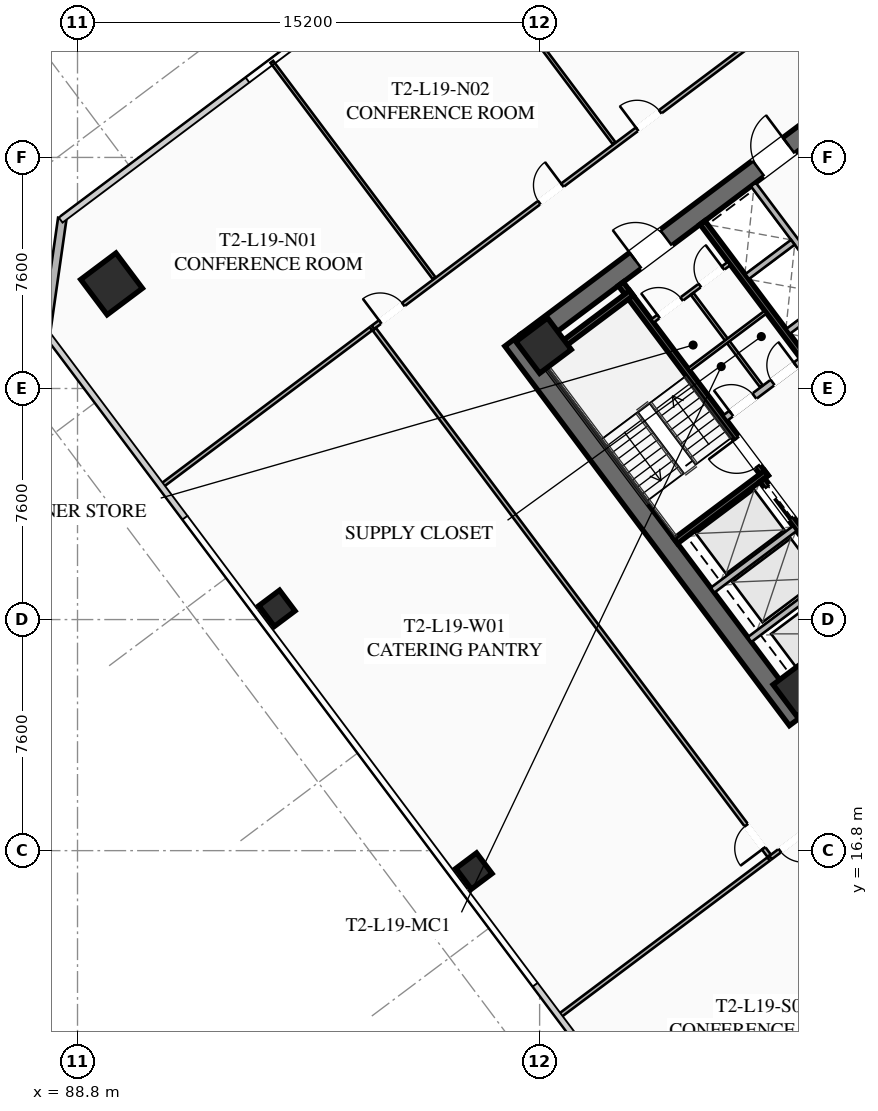
"""IFC4 building model, lengths in metres.
Left out: names, types, materials, properties, quantities, classifications, styles, units other than length and angle.
Written with IfcOpenShell. Run it as: python <this file> out.ifc"""

import sys

from ifc_helpers import new_model, si_unit, direction, frame, frame_2d, origin, origin_2d, place, context, subcontext, project, spatial, rectangle, hollow_rectangle, extrude, element, fill, save


model = new_model("IFC4")
c1 = context("Model", 3, precision=1e-05, world=origin(), true_north=direction((0.0, 1.0)))
c2 = subcontext(c1, "Body", "Model", "MODEL_VIEW")
j1 = project(units=[si_unit("LENGTHUNIT", "METRE"), si_unit("PLANEANGLEUNIT", "RADIAN")], contexts=[c1])
p1 = place(None, origin())
s1 = spatial("IfcSite", under=j1, at=p1, CompositionType="ELEMENT")
p2 = place(p1, origin())
s2 = spatial("IfcBuilding", under=s1, at=p2, CompositionType="ELEMENT")
p3 = place(p2, frame((0.0, 0.0, 74.3)))
s3 = spatial("IfcBuildingStorey", under=s2, at=p3, CompositionType="ELEMENT", Elevation=74.3)
p4 = place(p3, frame((112.476, 21.107, 0.0), z_axis=(0.0, 0.0, 1.0), x_axis=(-0.600005007985, 0.799996243986, 0.0)))
e1 = element("IfcWall", 1, at=p4, inside=s3, PredefinedType="SHEAR", context=c2, shape_type="SweptSolid", body=[
    extrude(rectangle(XDim=15.6, YDim=0.65, at=frame_2d((7.8, 0.0))), origin(), (0.0, 0.0, 1.0), 3.55),
])
p5 = place(p3, frame((124.429, 30.478, 0.0), z_axis=(0.0, 0.0, 1.0), x_axis=(-0.799998028465, -0.600002628705, 0.0)))
e2 = element("IfcWall", 2, at=p5, inside=s3, PredefinedType="SHEAR", context=c2, shape_type="SweptSolid", body=[
    extrude(rectangle(XDim=14.86, YDim=0.65, at=frame_2d((7.43, 0.0))), origin(), (0.0, 0.0, 1.0), 3.55),
])
p6 = place(p5, frame((9.13, 0.0, 0.0)))
e3 = element("IfcOpeningElement", 3, at=p6, cuts=e2, PredefinedType="OPENING", context=c2, shape_type="SweptSolid", body=[
    extrude(rectangle(XDim=1.25, YDim=2.25, at=frame_2d((0.625, 1.125))), frame((0.0, 0.335, 0.0), z_axis=(0.0, -1.0, 0.0), x_axis=(1.0, 0.0, 0.0)), (0.0, 0.0, 1.0), 0.67),
])
p7 = place(p5, frame((4.08, 0.0, 0.0)))
e4 = element("IfcOpeningElement", 4, at=p7, cuts=e2, PredefinedType="OPENING", context=c2, shape_type="SweptSolid", body=[
    extrude(rectangle(XDim=1.25, YDim=2.25, at=frame_2d((0.625, 1.125))), frame((0.0, 0.335, 0.0), z_axis=(0.0, -1.0, 0.0), x_axis=(1.0, 0.0, 0.0)), (0.0, 0.0, 1.0), 0.67),
])
p8 = place(p3, frame((103.571, 33.522, 0.0), z_axis=(0.0, 0.0, 1.0), x_axis=(0.799998028465, 0.600002628705, 0.0)))
e5 = element("IfcWall", 5, at=p8, inside=s3, PredefinedType="SHEAR", context=c2, shape_type="SweptSolid", body=[
    extrude(rectangle(XDim=14.86, YDim=0.65, at=frame_2d((7.43, 0.0))), origin(), (0.0, 0.0, 1.0), 3.55),
])
p9 = place(p8, frame((4.48, 0.0, 0.0)))
e6 = element("IfcOpeningElement", 6, at=p9, cuts=e5, PredefinedType="OPENING", context=c2, shape_type="SweptSolid", body=[
    extrude(rectangle(XDim=1.25, YDim=2.25, at=frame_2d((0.625, 1.125))), frame((0.0, 0.335, 0.0), z_axis=(0.0, -1.0, 0.0), x_axis=(1.0, 0.0, 0.0)), (0.0, 0.0, 1.0), 0.67),
])
p10 = place(p8, frame((9.53, 0.0, 0.0)))
e7 = element("IfcOpeningElement", 7, at=p10, cuts=e5, PredefinedType="OPENING", context=c2, shape_type="SweptSolid", body=[
    extrude(rectangle(XDim=1.25, YDim=2.25, at=frame_2d((0.625, 1.125))), frame((0.0, 0.335, 0.0), z_axis=(0.0, -1.0, 0.0), x_axis=(1.0, 0.0, 0.0)), (0.0, 0.0, 1.0), 0.67),
])
for number, where, z_axis, x_axis in (
    (8, (112.59, 22.13, 0.0), (0.0, 0.0, 1.0), (0.8, 0.6, 0.0)),
    (9, (104.13, 33.41, 0.0), (0.0, 0.0, 1.0), (0.8, 0.6, 0.0)),
):
    element("IfcColumn", number, at=place(p3, frame(where, z_axis=z_axis, x_axis=x_axis)), inside=s3, PredefinedType="COLUMN", context=c2, shape_type="SweptSolid", body=[
        extrude(hollow_rectangle(XDim=1.3, YDim=1.3, WallThickness=0.05, at=origin_2d()), origin(), (0.0, 0.0, 1.0), 3.35),
    ])
p11 = place(p3, frame((89.92, 35.44, 0.0), z_axis=(0.0, 0.0, 1.0), x_axis=(0.799999996291, 0.600000004945, 0.0)))
e10 = element("IfcColumn", 10, at=p11, inside=s3, PredefinedType="COLUMN", context=c2, shape_type="SweptSolid", body=[
    extrude(hollow_rectangle(XDim=1.45, YDim=1.45, WallThickness=0.055, at=origin_2d()), origin(), (0.0, 0.0, 1.0), 3.35),
])
for number, where, z_axis, x_axis in (
    (11, (95.36, 24.77, 0.0), (0.0, 0.0, 1.0), (0.8, 0.6, 0.0)),
    (12, (101.84, 16.13, 0.0), (0.0, 0.0, 1.0), (0.8, 0.6, 0.0)),
):
    element("IfcColumn", number, at=place(p3, frame(where, z_axis=z_axis, x_axis=x_axis)), inside=s3, PredefinedType="COLUMN", context=c2, shape_type="SweptSolid", body=[
        extrude(hollow_rectangle(XDim=0.85, YDim=0.85, WallThickness=0.035, at=origin_2d()), origin(), (0.0, 0.0, 1.0), 3.35),
    ])
p12 = place(p3, frame((87.76, 33.82, 0.0), z_axis=(0.0, 0.0, 1.0), x_axis=(0.141430307517, 0.989948214866, 0.0)))
e13 = element("IfcWall", 13, at=p12, inside=s3, PredefinedType="SOLIDWALL", context=c2, shape_type="SweptSolid", body=[
    extrude(rectangle(XDim=3.818, YDim=0.28, at=frame_2d((1.909, 0.0))), origin(), (0.0, 0.0, 1.0), 3.35),
])
p13 = place(p3, frame((111.44, 29.08, 0.0), z_axis=(0.0, 0.0, 1.0), x_axis=(-0.600009827119, 0.799992629566, 0.0)))
e14 = element("IfcWall", 14, at=p13, inside=s3, PredefinedType="SHEAR", context=c2, shape_type="SweptSolid", body=[
    extrude(rectangle(XDim=7.95, YDim=0.2, at=frame_2d((3.975, 0.0))), origin(), (0.0, 0.0, 1.0), 3.35),
])
p14 = place(p13, frame((0.45, 0.0, 0.0)))
e15 = element("IfcOpeningElement", 15, at=p14, cuts=e14, PredefinedType="OPENING", context=c2, shape_type="SweptSolid", body=[
    extrude(rectangle(XDim=1.15, YDim=2.2, at=frame_2d((0.575, 1.1))), frame((0.0, 0.11, 0.0), z_axis=(0.0, -1.0, 0.0), x_axis=(1.0, 0.0, 0.0)), (0.0, 0.0, 1.0), 0.22),
])
for number, where, z_axis, x_axis in (
    (16, (108.476, 26.982, 0.0), (0.0, 0.0, 1.0), (0.8, 0.6, 0.0)),
    (17, (104.036, 32.902, 0.0), (0.0, 0.0, 1.0), (0.8, 0.6, 0.0)),
):
    element("IfcWall", number, at=place(p3, frame(where, z_axis=z_axis, x_axis=x_axis)), inside=s3, PredefinedType="SHEAR", context=c2, shape_type="SweptSolid", body=[
        extrude(rectangle(XDim=3.73, YDim=0.2, at=frame_2d((1.865, 0.0))), origin(), (0.0, 0.0, 1.0), 3.35),
    ])
p15 = place(p3, frame((117.938, 26.016, 0.0), z_axis=(0.0, 0.0, 1.0), x_axis=(-0.600005463273, 0.799995902516, 0.0)))
e18 = element("IfcWall", 18, at=p15, inside=s3, PredefinedType="SHEAR", context=c2, shape_type="SweptSolid", body=[
    extrude(rectangle(XDim=14.3, YDim=0.2, at=frame_2d((7.15, 0.0))), origin(), (0.0, 0.0, 1.0), 3.35),
])
p16 = place(p3, frame((110.104, 31.028, 0.0), z_axis=(0.0, 0.0, 1.0), x_axis=(0.800018601094, 0.59997519774, 0.0)))
e19 = element("IfcWall", 19, at=p16, inside=s3, PredefinedType="SOLIDWALL", context=c2, shape_type="SweptSolid", body=[
    extrude(rectangle(XDim=3.15, YDim=0.22, at=frame_2d((1.575, 0.0))), origin(), (0.0, 0.0, 1.0), 2.703),
])
p17 = place(p16, frame((0.25, 0.0, 0.0)))
e20 = element("IfcOpeningElement", 20, at=p17, cuts=e19, PredefinedType="OPENING", context=c2, shape_type="SweptSolid", body=[
    extrude(rectangle(XDim=0.95, YDim=2.05, at=frame_2d((0.475, 1.025))), frame((0.0, 0.12, 0.0), z_axis=(0.0, -1.0, 0.0), x_axis=(1.0, 0.0, 0.0)), (0.0, 0.0, 1.0), 0.24),
])
p18 = place(p16, frame((1.95, 0.0, 0.0)))
e21 = element("IfcOpeningElement", 21, at=p18, cuts=e19, PredefinedType="OPENING", context=c2, shape_type="SweptSolid", body=[
    extrude(rectangle(XDim=0.95, YDim=2.05, at=frame_2d((0.475, 1.025))), frame((0.0, 0.12, 0.0), z_axis=(0.0, -1.0, 0.0), x_axis=(1.0, 0.0, 0.0)), (0.0, 0.0, 1.0), 0.24),
])
p19 = place(p3, frame((115.13, 23.91, 0.0), z_axis=(0.0, 0.0, 1.0), x_axis=(-0.599975393228, 0.800018454488, 0.0)))
e22 = element("IfcWall", 22, at=p19, inside=s3, PredefinedType="SHEAR", context=c2, shape_type="SweptSolid", body=[
    extrude(rectangle(XDim=6.35, YDim=0.2, at=frame_2d((3.175, 0.0))), origin(), (0.0, 0.0, 1.0), 3.35),
])
p20 = place(p19, frame((4.775, 0.0, 0.0)))
e23 = element("IfcOpeningElement", 23, at=p20, cuts=e22, PredefinedType="OPENING", context=c2, shape_type="SweptSolid", body=[
    extrude(rectangle(XDim=1.3, YDim=2.25, at=frame_2d((0.65, 1.125))), frame((0.0, 0.11, 0.0), z_axis=(0.0, -1.0, 0.0), x_axis=(1.0, 0.0, 0.0)), (0.0, 0.0, 1.0), 0.22),
])
p21 = place(p19, frame((2.775, 0.0, 0.0)))
e24 = element("IfcOpeningElement", 24, at=p21, cuts=e22, PredefinedType="OPENING", context=c2, shape_type="SweptSolid", body=[
    extrude(rectangle(XDim=1.3, YDim=2.25, at=frame_2d((0.65, 1.125))), frame((0.0, 0.11, 0.0), z_axis=(0.0, -1.0, 0.0), x_axis=(1.0, 0.0, 0.0)), (0.0, 0.0, 1.0), 0.22),
])
p22 = place(p19, frame((0.575, 0.0, 0.0)))
e25 = element("IfcOpeningElement", 25, at=p22, cuts=e22, PredefinedType="OPENING", context=c2, shape_type="SweptSolid", body=[
    extrude(rectangle(XDim=1.3, YDim=2.25, at=frame_2d((0.65, 1.125))), frame((0.0, 0.11, 0.0), z_axis=(0.0, -1.0, 0.0), x_axis=(1.0, 0.0, 0.0)), (0.0, 0.0, 1.0), 0.22),
])
for number, where, z_axis, x_axis in (
    (26, (110.906, 23.742, 0.0), (0.0, 0.0, 1.0), (0.8, 0.6, 0.0)),
    (27, (109.688, 25.366, 0.0), (0.0, 0.0, 1.0), (0.8, 0.6, 0.0)),
):
    element("IfcWall", number, at=place(p3, frame(where, z_axis=z_axis, x_axis=x_axis)), inside=s3, PredefinedType="SOLIDWALL", context=c2, shape_type="SweptSolid", body=[
        extrude(rectangle(XDim=3.38, YDim=0.2, at=frame_2d((1.69, 0.0))), origin(), (0.0, 0.0, 1.0), 3.35),
    ])
p23 = place(p3, frame((107.71, 34.22, 0.0), z_axis=(0.0, 0.0, 1.0), x_axis=(0.799981399002, 0.60002480053, 0.0)))
e28 = element("IfcWall", 28, at=p23, inside=s3, PredefinedType="PARTITIONING", context=c2, shape_type="SweptSolid", body=[
    extrude(rectangle(XDim=3.15, YDim=0.135, at=frame_2d((1.575, 0.0))), origin(), (0.0, 0.0, 1.0), 2.703),
])
p24 = place(p23, frame((0.25, 0.0, 0.0)))
e29 = element("IfcOpeningElement", 29, at=p24, cuts=e28, PredefinedType="OPENING", context=c2, shape_type="SweptSolid", body=[
    extrude(rectangle(XDim=0.95, YDim=2.05, at=frame_2d((0.475, 1.025))), frame((0.0, 0.077, 0.0), z_axis=(0.0, -1.0, 0.0), x_axis=(1.0, 0.0, 0.0)), (0.0, 0.0, 1.0), 0.155),
])
p25 = place(p23, frame((1.95, 0.0, 0.0)))
e30 = element("IfcOpeningElement", 30, at=p25, cuts=e28, PredefinedType="OPENING", context=c2, shape_type="SweptSolid", body=[
    extrude(rectangle(XDim=0.95, YDim=2.05, at=frame_2d((0.475, 1.025))), frame((0.0, 0.077, 0.0), z_axis=(0.0, -1.0, 0.0), x_axis=(1.0, 0.0, 0.0)), (0.0, 0.0, 1.0), 0.155),
])
p26 = place(p3, frame((111.296, 32.072, 0.0), z_axis=(0.0, 0.0, 1.0), x_axis=(-0.59995887973, 0.800030838552, 0.0)))
e31 = element("IfcWall", 31, at=p26, inside=s3, PredefinedType="PARTITIONING", context=c2, shape_type="SweptSolid", body=[
    extrude(rectangle(XDim=3.8, YDim=0.11, at=frame_2d((1.9, 0.0))), origin(), (0.0, 0.0, 1.0), 2.703),
])
p27 = place(p3, frame((108.91, 32.62, 0.0), z_axis=(0.0, 0.0, 1.0), x_axis=(0.800018601094, 0.59997519774, 0.0)))
e32 = element("IfcWall", 32, at=p27, inside=s3, PredefinedType="PARTITIONING", context=c2, shape_type="SweptSolid", body=[
    extrude(rectangle(XDim=3.15, YDim=0.11, at=frame_2d((1.575, 0.0))), origin(), (0.0, 0.0, 1.0), 2.703),
])
p28 = place(p3, frame((115.11, 33.27, 0.0), z_axis=(0.0, 0.0, 1.0), x_axis=(-0.600011488909, 0.79999138319, 0.0)))
e33 = element("IfcWall", 33, at=p28, inside=s3, PredefinedType="SOLIDWALL", context=c2, shape_type="SweptSolid", body=[
    extrude(rectangle(XDim=6.8, YDim=0.2, at=frame_2d((3.4, 0.0))), origin(), (0.0, 0.0, 1.0), 3.35),
])
p29 = place(p3, frame((112.176, 33.882, 0.0), z_axis=(0.0, 0.0, 1.0), x_axis=(0.8, 0.6, 0.0)))
e34 = element("IfcWall", 34, at=p29, inside=s3, PredefinedType="SOLIDWALL", context=c2, shape_type="SweptSolid", body=[
    extrude(rectangle(XDim=1.88, YDim=0.2, at=frame_2d((0.94, 0.0))), origin(), (0.0, 0.0, 1.0), 3.35),
])
p30 = place(p3, frame((110.826, 35.682, 0.0), z_axis=(0.0, 0.0, 1.0), x_axis=(0.799984418148, 0.600020775241, 0.0)))
e35 = element("IfcWall", 35, at=p30, inside=s3, PredefinedType="SOLIDWALL", context=c2, shape_type="SweptSolid", body=[
    extrude(rectangle(XDim=1.88, YDim=0.2, at=frame_2d((0.94, 0.0))), origin(), (0.0, 0.0, 1.0), 3.35),
])
p31 = place(p3, frame((98.516, 34.012, 0.0), z_axis=(0.0, 0.0, 1.0), x_axis=(0.8, 0.6, 0.0)))
e36 = element("IfcWall", 36, at=p31, inside=s3, PredefinedType="PARTITIONING", context=c2, shape_type="SweptSolid", body=[
    extrude(rectangle(XDim=28.23, YDim=0.135, at=frame_2d((14.115, 0.0))), origin(), (0.0, 0.0, 1.0), 2.703),
])
p32 = place(p31, frame((0.3, 0.0, 0.0)))
e37 = element("IfcOpeningElement", 37, at=p32, cuts=e36, PredefinedType="OPENING", context=c2, shape_type="SweptSolid", body=[
    extrude(rectangle(XDim=0.95, YDim=2.05, at=frame_2d((0.475, 1.025))), frame((0.0, 0.077, 0.0), z_axis=(0.0, -1.0, 0.0), x_axis=(1.0, 0.0, 0.0)), (0.0, 0.0, 1.0), 0.155),
])
p33 = place(p31, frame((6.84, 0.0, 0.0)))
e38 = element("IfcOpeningElement", 38, at=p33, cuts=e36, PredefinedType="OPENING", context=c2, shape_type="SweptSolid", body=[
    extrude(rectangle(XDim=0.95, YDim=2.05, at=frame_2d((0.475, 1.025))), frame((0.0, 0.077, 0.0), z_axis=(0.0, -1.0, 0.0), x_axis=(1.0, 0.0, 0.0)), (0.0, 0.0, 1.0), 0.155),
])
p34 = place(p31, frame((10.863, 0.0, 0.0)))
e39 = element("IfcOpeningElement", 39, at=p34, cuts=e36, PredefinedType="OPENING", context=c2, shape_type="SweptSolid", body=[
    extrude(rectangle(XDim=0.95, YDim=2.05, at=frame_2d((0.475, 1.025))), frame((0.0, 0.077, 0.0), z_axis=(0.0, -1.0, 0.0), x_axis=(1.0, 0.0, 0.0)), (0.0, 0.0, 1.0), 0.155),
])
p35 = place(p31, frame((26.98, 0.0, 0.0)))
e40 = element("IfcOpeningElement", 40, at=p35, cuts=e36, PredefinedType="OPENING", context=c2, shape_type="SweptSolid", body=[
    extrude(rectangle(XDim=0.95, YDim=2.05, at=frame_2d((0.475, 1.025))), frame((0.0, 0.077, 0.0), z_axis=(0.0, -1.0, 0.0), x_axis=(1.0, 0.0, 0.0)), (0.0, 0.0, 1.0), 0.155),
])
for number, where, z_axis, x_axis in (
    (41, (100.532, 35.624, 0.0), (0.0, 0.0, 1.0), (-0.6, 0.8, 0.0)),
    (42, (106.452, 40.064, 0.0), (0.0, 0.0, 1.0), (-0.6, 0.8, 0.0)),
):
    element("IfcWall", number, at=place(p3, frame(where, z_axis=z_axis, x_axis=x_axis)), inside=s3, PredefinedType="PARTITIONING", context=c2, shape_type="SweptSolid", body=[
        extrude(rectangle(XDim=8.9, YDim=0.11, at=frame_2d((4.45, 0.0))), origin(), (0.0, 0.0, 1.0), 2.703),
    ])
p36 = place(p3, frame((134.18, 33.51, 0.0), z_axis=(0.0, 0.0, 1.0), x_axis=(-0.8, -0.6, 0.0)))
e43 = element("IfcWall", 43, at=p36, inside=s3, PredefinedType="PARTITIONING", context=c2, shape_type="SweptSolid", body=[
    extrude(rectangle(XDim=28.23, YDim=0.135, at=frame_2d((14.115, 0.0))), origin(), (0.0, 0.0, 1.0), 2.703),
])
p37 = place(p36, frame((26.9, 0.0, 0.0)))
e44 = element("IfcOpeningElement", 44, at=p37, cuts=e43, PredefinedType="OPENING", context=c2, shape_type="SweptSolid", body=[
    extrude(rectangle(XDim=0.95, YDim=2.05, at=frame_2d((0.475, 1.025))), frame((0.0, 0.077, 0.0), z_axis=(0.0, -1.0, 0.0), x_axis=(1.0, 0.0, 0.0)), (0.0, 0.0, 1.0), 0.155),
])
p38 = place(p36, frame((20.399, 0.0, 0.0)))
e45 = element("IfcOpeningElement", 45, at=p38, cuts=e43, PredefinedType="OPENING", context=c2, shape_type="SweptSolid", body=[
    extrude(rectangle(XDim=0.95, YDim=2.05, at=frame_2d((0.475, 1.025))), frame((0.0, 0.077, 0.0), z_axis=(0.0, -1.0, 0.0), x_axis=(1.0, 0.0, 0.0)), (0.0, 0.0, 1.0), 0.155),
])
p39 = place(p36, frame((16.339, 0.0, 0.0)))
e46 = element("IfcOpeningElement", 46, at=p39, cuts=e43, PredefinedType="OPENING", context=c2, shape_type="SweptSolid", body=[
    extrude(rectangle(XDim=0.95, YDim=2.05, at=frame_2d((0.475, 1.025))), frame((0.0, 0.077, 0.0), z_axis=(0.0, -1.0, 0.0), x_axis=(1.0, 0.0, 0.0)), (0.0, 0.0, 1.0), 0.155),
])
p40 = place(p36, frame((0.38, 0.0, 0.0)))
e47 = element("IfcOpeningElement", 47, at=p40, cuts=e43, PredefinedType="OPENING", context=c2, shape_type="SweptSolid", body=[
    extrude(rectangle(XDim=0.95, YDim=2.05, at=frame_2d((0.475, 1.025))), frame((0.0, 0.077, 0.0), z_axis=(0.0, -1.0, 0.0), x_axis=(1.0, 0.0, 0.0)), (0.0, 0.0, 1.0), 0.155),
])
p41 = place(p3, frame((111.548, 16.636, 0.0), z_axis=(0.0, 0.0, 1.0), x_axis=(-0.600003610192, 0.799997292343, 0.0)))
e48 = element("IfcWall", 48, at=p41, inside=s3, PredefinedType="PARTITIONING", context=c2, shape_type="SweptSolid", body=[
    extrude(rectangle(XDim=21.64, YDim=0.135, at=frame_2d((10.82, 0.0))), origin(), (0.0, 0.0, 1.0), 2.703),
])
p42 = place(p41, frame((0.3, 0.0, 0.0)))
e49 = element("IfcOpeningElement", 49, at=p42, cuts=e48, PredefinedType="OPENING", context=c2, shape_type="SweptSolid", body=[
    extrude(rectangle(XDim=0.95, YDim=2.05, at=frame_2d((0.475, 1.025))), frame((0.0, 0.077, 0.0), z_axis=(0.0, -1.0, 0.0), x_axis=(1.0, 0.0, 0.0)), (0.0, 0.0, 1.0), 0.155),
])
p43 = place(p3, frame((98.452, 33.964, 0.0), z_axis=(0.0, 0.0, 1.0), x_axis=(-0.799993202584, -0.600009063115, 0.0)))
e50 = element("IfcWall", 50, at=p43, inside=s3, PredefinedType="PARTITIONING", context=c2, shape_type="SweptSolid", body=[
    extrude(rectangle(XDim=8.62, YDim=0.135, at=frame_2d((4.31, 0.0))), origin(), (0.0, 0.0, 1.0), 2.703),
])
p44 = place(p3, frame((104.636, 11.352, 0.0), z_axis=(0.0, 0.0, 1.0), x_axis=(0.800006797429, 0.599990936654, 0.0)))
e51 = element("IfcWall", 51, at=p44, inside=s3, PredefinedType="PARTITIONING", context=c2, shape_type="SweptSolid", body=[
    extrude(rectangle(XDim=8.62, YDim=0.135, at=frame_2d((4.31, 0.0))), origin(), (0.0, 0.0, 1.0), 2.703),
])
p45 = place(p9, origin())
e52 = element("IfcDoor", 52, at=p45, inside=s3, OperationType="SINGLE_SWING_LEFT", PredefinedType="DOOR", context=c2, shape_type="SweptSolid", body=[
    extrude(rectangle(XDim=1.25, YDim=2.25, at=frame_2d((0.625, 1.125))), frame((0.0, 0.025, 0.0), z_axis=(0.0, -1.0, 0.0), x_axis=(1.0, 0.0, 0.0)), (0.0, 0.0, 1.0), 0.05),
])
fill(e6, e52)
p46 = place(p10, origin())
e53 = element("IfcDoor", 53, at=p46, inside=s3, OperationType="SINGLE_SWING_RIGHT", PredefinedType="DOOR", context=c2, shape_type="SweptSolid", body=[
    extrude(rectangle(XDim=1.25, YDim=2.25, at=frame_2d((0.625, 1.125))), frame((0.0, 0.025, 0.0), z_axis=(0.0, -1.0, 0.0), x_axis=(1.0, 0.0, 0.0)), (0.0, 0.0, 1.0), 0.05),
])
fill(e7, e53)
p47 = place(p14, origin())
e54 = element("IfcDoor", 54, at=p47, inside=s3, OperationType="SINGLE_SWING_RIGHT", PredefinedType="DOOR", context=c2, shape_type="SweptSolid", body=[
    extrude(rectangle(XDim=1.15, YDim=2.2, at=frame_2d((0.575, 1.1))), frame((0.0, 0.025, 0.0), z_axis=(0.0, -1.0, 0.0), x_axis=(1.0, 0.0, 0.0)), (0.0, 0.0, 1.0), 0.05),
])
fill(e15, e54)
p48 = place(p24, origin())
e55 = element("IfcDoor", 55, at=p48, inside=s3, OperationType="SINGLE_SWING_LEFT", PredefinedType="DOOR", context=c2, shape_type="SweptSolid", body=[
    extrude(rectangle(XDim=0.95, YDim=2.05, at=frame_2d((0.475, 1.025))), frame((0.0, 0.025, 0.0), z_axis=(0.0, -1.0, 0.0), x_axis=(1.0, 0.0, 0.0)), (0.0, 0.0, 1.0), 0.05),
])
fill(e29, e55)
p49 = place(p25, origin())
e56 = element("IfcDoor", 56, at=p49, inside=s3, OperationType="SINGLE_SWING_RIGHT", PredefinedType="DOOR", context=c2, shape_type="SweptSolid", body=[
    extrude(rectangle(XDim=0.95, YDim=2.05, at=frame_2d((0.475, 1.025))), frame((0.0, 0.025, 0.0), z_axis=(0.0, -1.0, 0.0), x_axis=(1.0, 0.0, 0.0)), (0.0, 0.0, 1.0), 0.05),
])
fill(e30, e56)
p50 = place(p17, origin())
e57 = element("IfcDoor", 57, at=p50, inside=s3, OperationType="SINGLE_SWING_LEFT", PredefinedType="DOOR", context=c2, shape_type="SweptSolid", body=[
    extrude(rectangle(XDim=0.95, YDim=2.05, at=frame_2d((0.475, 1.025))), frame((0.0, 0.025, 0.0), z_axis=(0.0, -1.0, 0.0), x_axis=(1.0, 0.0, 0.0)), (0.0, 0.0, 1.0), 0.05),
])
fill(e20, e57)
p51 = place(p18, origin())
e58 = element("IfcDoor", 58, at=p51, inside=s3, OperationType="SINGLE_SWING_RIGHT", PredefinedType="DOOR", context=c2, shape_type="SweptSolid", body=[
    extrude(rectangle(XDim=0.95, YDim=2.05, at=frame_2d((0.475, 1.025))), frame((0.0, 0.025, 0.0), z_axis=(0.0, -1.0, 0.0), x_axis=(1.0, 0.0, 0.0)), (0.0, 0.0, 1.0), 0.05),
])
fill(e21, e58)
p52 = place(p32, origin())
e59 = element("IfcDoor", 59, at=p52, inside=s3, OperationType="SINGLE_SWING_LEFT", PredefinedType="DOOR", context=c2, shape_type="SweptSolid", body=[
    extrude(rectangle(XDim=0.95, YDim=2.05, at=frame_2d((0.475, 1.025))), frame((0.0, 0.025, 0.0), z_axis=(0.0, -1.0, 0.0), x_axis=(1.0, 0.0, 0.0)), (0.0, 0.0, 1.0), 0.05),
])
fill(e37, e59)
p53 = place(p33, origin())
e60 = element("IfcDoor", 60, at=p53, inside=s3, OperationType="SINGLE_SWING_RIGHT", PredefinedType="DOOR", context=c2, shape_type="SweptSolid", body=[
    extrude(rectangle(XDim=0.95, YDim=2.05, at=frame_2d((0.475, 1.025))), frame((0.0, 0.025, 0.0), z_axis=(0.0, -1.0, 0.0), x_axis=(1.0, 0.0, 0.0)), (0.0, 0.0, 1.0), 0.05),
])
fill(e38, e60)
p54 = place(p34, origin())
e61 = element("IfcDoor", 61, at=p54, inside=s3, OperationType="SINGLE_SWING_LEFT", PredefinedType="DOOR", context=c2, shape_type="SweptSolid", body=[
    extrude(rectangle(XDim=0.95, YDim=2.05, at=frame_2d((0.475, 1.025))), frame((0.0, 0.025, 0.0), z_axis=(0.0, -1.0, 0.0), x_axis=(1.0, 0.0, 0.0)), (0.0, 0.0, 1.0), 0.05),
])
fill(e39, e61)
p55 = place(p37, origin())
e62 = element("IfcDoor", 62, at=p55, inside=s3, OperationType="SINGLE_SWING_LEFT", PredefinedType="DOOR", context=c2, shape_type="SweptSolid", body=[
    extrude(rectangle(XDim=0.95, YDim=2.05, at=frame_2d((0.475, 1.025))), frame((0.0, 0.025, 0.0), z_axis=(0.0, -1.0, 0.0), x_axis=(1.0, 0.0, 0.0)), (0.0, 0.0, 1.0), 0.05),
])
fill(e44, e62)
p56 = place(p42, origin())
e63 = element("IfcDoor", 63, at=p56, inside=s3, OperationType="SINGLE_SWING_LEFT", PredefinedType="DOOR", context=c2, shape_type="SweptSolid", body=[
    extrude(rectangle(XDim=0.95, YDim=2.05, at=frame_2d((0.475, 1.025))), frame((0.0, 0.025, 0.0), z_axis=(0.0, -1.0, 0.0), x_axis=(1.0, 0.0, 0.0)), (0.0, 0.0, 1.0), 0.05),
])
fill(e49, e63)
p57 = place(p20, origin())
e64 = element("IfcDoor", 64, at=p57, inside=s3, OperationType="SLIDING_TO_LEFT", PredefinedType="DOOR", context=c2, shape_type="SweptSolid", body=[
    extrude(rectangle(XDim=1.3, YDim=2.25, at=frame_2d((0.65, 1.125))), frame((0.0, 0.025, 0.0), z_axis=(0.0, -1.0, 0.0), x_axis=(1.0, 0.0, 0.0)), (0.0, 0.0, 1.0), 0.05),
])
fill(e23, e64)
save(model, sys.argv[1])
